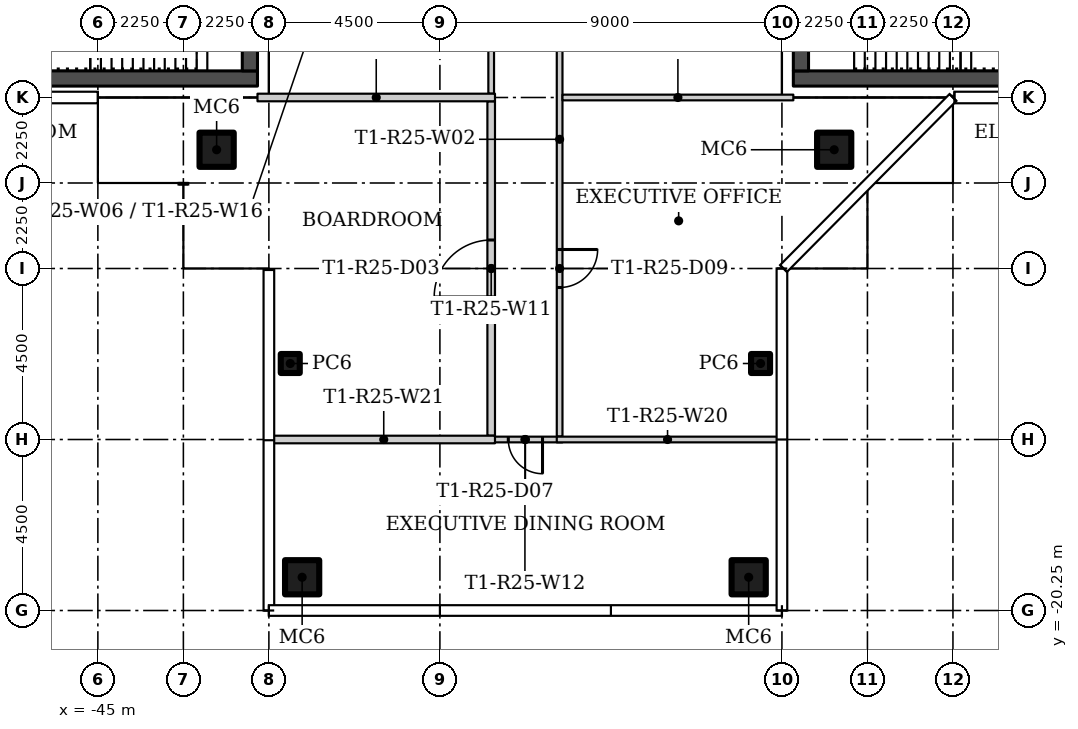
"""IFC4 building model, lengths in metres.
Left out: names, types, materials, properties, quantities, classifications, styles, units other than length and angle.
Written with IfcOpenShell. Run it as: python <this file> out.ifc"""

import sys

from ifc_helpers import new_model, si_unit, direction, frame, frame_2d, origin, origin_2d, place, context, subcontext, project, spatial, rectangle, hollow_rectangle, extrude, element, fill, save


model = new_model("IFC4")
c1 = context("Model", 3, precision=1e-05, world=origin(), true_north=direction((0.0, 1.0)))
c2 = subcontext(c1, "Body", "Model", "MODEL_VIEW")
j1 = project(units=[si_unit("LENGTHUNIT", "METRE"), si_unit("PLANEANGLEUNIT", "RADIAN")], contexts=[c1])
p1 = place(None, origin())
s1 = spatial("IfcSite", under=j1, at=p1, CompositionType="ELEMENT")
p2 = place(p1, origin())
s2 = spatial("IfcBuilding", under=s1, at=p2, CompositionType="ELEMENT")
p3 = place(p2, frame((0.0, 0.0, 230.4)))
s3 = spatial("IfcBuildingStorey", under=s2, at=p3, CompositionType="ELEMENT", Elevation=230.4)
for number, where in (
    (1, (-25.625, -8.125, 0.0)),
    (2, (-41.875, -8.125, 0.0)),
):
    element("IfcColumn", number, at=place(p3, frame(where)), inside=s3, PredefinedType="COLUMN", context=c2, shape_type="SweptSolid", body=[
        extrude(hollow_rectangle(XDim=0.9, YDim=0.9, WallThickness=0.036, at=origin_2d()), origin(), (0.0, 0.0, 1.0), 3.55),
    ])
p4 = place(p3, frame((-39.938, -13.75, 0.0)))
e3 = element("IfcColumn", 3, at=p4, inside=s3, PredefinedType="COLUMN", context=c2, shape_type="SweptSolid", body=[
    extrude(hollow_rectangle(XDim=0.5, YDim=0.5, WallThickness=0.016, at=origin_2d()), origin(), (0.0, 0.0, 1.0), 3.55),
])
p5 = place(p3, frame((-39.625, -19.375, 0.0)))
e4 = element("IfcColumn", 4, at=p5, inside=s3, PredefinedType="COLUMN", context=c2, shape_type="SweptSolid", body=[
    extrude(hollow_rectangle(XDim=0.9, YDim=0.9, WallThickness=0.036, at=origin_2d()), origin(), (0.0, 0.0, 1.0), 3.55),
])
p6 = place(p3, frame((-27.562, -13.75, 0.0)))
e5 = element("IfcColumn", 5, at=p6, inside=s3, PredefinedType="COLUMN", context=c2, shape_type="SweptSolid", body=[
    extrude(hollow_rectangle(XDim=0.5, YDim=0.5, WallThickness=0.016, at=origin_2d()), origin(), (0.0, 0.0, 1.0), 3.55),
])
p7 = place(p3, frame((-27.875, -19.375, 0.0)))
e6 = element("IfcColumn", 6, at=p7, inside=s3, PredefinedType="COLUMN", context=c2, shape_type="SweptSolid", body=[
    extrude(hollow_rectangle(XDim=0.9, YDim=0.9, WallThickness=0.036, at=origin_2d()), origin(), (0.0, 0.0, 1.0), 3.55),
])
p8 = place(p3, frame((-32.85, -0.025, 0.0), z_axis=(0.0, 0.0, 1.0), x_axis=(0.0, -1.0, 0.0)))
e7 = element("IfcWall", 7, at=p8, inside=s3, PredefinedType="PARTITIONING", context=c2, shape_type="SweptSolid", body=[
    extrude(rectangle(XDim=15.65, YDim=0.15, at=frame_2d((7.825, 0.0))), origin(), (0.0, 0.0, 1.0), 3.55),
])
p9 = place(p8, frame((2.875, 0.0, 0.0)))
e8 = element("IfcOpeningElement", 8, at=p9, cuts=e7, PredefinedType="OPENING", context=c2, shape_type="SweptSolid", body=[
    extrude(rectangle(XDim=0.9, YDim=2.1, at=frame_2d((0.45, 1.05))), frame((0.0, 0.085, 0.0), z_axis=(0.0, -1.0, 0.0), x_axis=(1.0, 0.0, 0.0)), (0.0, 0.0, 1.0), 0.17),
])
p10 = place(p8, frame((10.725, 0.0, 0.0)))
e9 = element("IfcOpeningElement", 9, at=p10, cuts=e7, PredefinedType="OPENING", context=c2, shape_type="SweptSolid", body=[
    extrude(rectangle(XDim=1.0, YDim=2.4, at=frame_2d((0.5, 1.2))), frame((0.0, 0.085, 0.0), z_axis=(0.0, -1.0, 0.0), x_axis=(1.0, 0.0, 0.0)), (0.0, 0.0, 1.0), 0.17),
])
p11 = place(p3, frame((-34.65, -6.65, 0.0), z_axis=(0.0, 0.0, 1.0), x_axis=(0.0, 1.0, 0.0)))
e10 = element("IfcWall", 10, at=p11, inside=s3, PredefinedType="PARTITIONING", context=c2, shape_type="SweptSolid", body=[
    extrude(rectangle(XDim=6.625, YDim=0.15, at=frame_2d((3.312, 0.0))), origin(), (0.0, 0.0, 1.0), 3.55),
])
p12 = place(p11, frame((2.8, 0.0, 0.0)))
e11 = element("IfcOpeningElement", 11, at=p12, cuts=e10, PredefinedType="OPENING", context=c2, shape_type="SweptSolid", body=[
    extrude(rectangle(XDim=1.0, YDim=2.4, at=frame_2d((0.5, 1.2))), frame((0.0, 0.085, 0.0), z_axis=(0.0, -1.0, 0.0), x_axis=(1.0, 0.0, 0.0)), (0.0, 0.0, 1.0), 0.17),
])
p13 = place(p3, frame((-34.65, -15.65, 0.0), z_axis=(0.0, 0.0, 1.0), x_axis=(0.0, 1.0, 0.0)))
e12 = element("IfcWall", 12, at=p13, inside=s3, PredefinedType="PARTITIONING", context=c2, shape_type="SweptSolid", body=[
    extrude(rectangle(XDim=8.8, YDim=0.2, at=frame_2d((4.4, 0.0))), origin(), (0.0, 0.0, 1.0), 3.55),
])
p14 = place(p13, frame((3.65, 0.0, 0.0)))
e13 = element("IfcOpeningElement", 13, at=p14, cuts=e12, PredefinedType="OPENING", context=c2, shape_type="SweptSolid", body=[
    extrude(rectangle(XDim=1.5, YDim=2.4, at=frame_2d((0.75, 1.2))), frame((0.0, 0.11, 0.0), z_axis=(0.0, -1.0, 0.0), x_axis=(1.0, 0.0, 0.0)), (0.0, 0.0, 1.0), 0.22),
])
p15 = place(p3, frame((-32.775, -15.75, 0.0), z_axis=(0.0, 0.0, 1.0), x_axis=(-1.0, 0.0, 0.0)))
e14 = element("IfcWall", 14, at=p15, inside=s3, PredefinedType="PARTITIONING", context=c2, shape_type="SweptSolid", body=[
    extrude(rectangle(XDim=1.976, YDim=0.15, at=frame_2d((0.988, 0.0))), origin(), (0.0, 0.0, 1.0), 3.55),
])
p16 = place(p15, frame((0.525, 0.0, 0.0)))
e15 = element("IfcOpeningElement", 15, at=p16, cuts=e14, PredefinedType="OPENING", context=c2, shape_type="SweptSolid", body=[
    extrude(rectangle(XDim=0.9, YDim=2.1, at=frame_2d((0.45, 1.05))), frame((0.0, 0.085, 0.0), z_axis=(0.0, -1.0, 0.0), x_axis=(1.0, 0.0, 0.0)), (0.0, 0.0, 1.0), 0.17),
])
p17 = place(p3, frame((-32.775, -6.75, 0.0)))
e16 = element("IfcWall", 16, at=p17, inside=s3, PredefinedType="PARTITIONING", context=c2, shape_type="SweptSolid", body=[
    extrude(rectangle(XDim=6.075, YDim=0.15, at=frame_2d((3.037, 0.0))), origin(), (0.0, 0.0, 1.0), 3.55),
])
p18 = place(p3, frame((-40.8, -6.75, 0.0)))
e17 = element("IfcWall", 17, at=p18, inside=s3, PredefinedType="PARTITIONING", context=c2, shape_type="SweptSolid", body=[
    extrude(rectangle(XDim=6.25, YDim=0.2, at=frame_2d((3.125, 0.0))), origin(), (0.0, 0.0, 1.0), 3.55),
])
p19 = place(p3, frame((-32.925, -15.75, 0.0)))
e18 = element("IfcWall", 18, at=p19, inside=s3, PredefinedType="PARTITIONING", context=c2, shape_type="SweptSolid", body=[
    extrude(rectangle(XDim=5.83, YDim=0.15, at=frame_2d((2.915, 0.0))), origin(), (0.0, 0.0, 1.0), 3.55),
])
p20 = place(p3, frame((-40.405, -15.75, 0.0)))
e19 = element("IfcWall", 19, at=p20, inside=s3, PredefinedType="PARTITIONING", context=c2, shape_type="SweptSolid", body=[
    extrude(rectangle(XDim=5.855, YDim=0.2, at=frame_2d((2.927, 0.0))), origin(), (0.0, 0.0, 1.0), 3.55),
])
p21 = place(p3, frame((-26.7, -6.25, 0.0)))
e20 = element("IfcWall", 20, at=p21, inside=s3, PredefinedType="SHEAR", context=c2, shape_type="SweptSolid", body=[
    extrude(rectangle(XDim=12.9, YDim=0.4, at=frame_2d((6.45, 0.0))), origin(), (0.0, 0.0, 1.0), 3.55),
])
p22 = place(p3, frame((-26.5, 6.05, 0.0), z_axis=(0.0, 0.0, 1.0), x_axis=(0.0, -1.0, 0.0)))
e21 = element("IfcWall", 21, at=p22, inside=s3, PredefinedType="SHEAR", context=c2, shape_type="SweptSolid", body=[
    extrude(rectangle(XDim=12.1, YDim=0.4, at=frame_2d((6.05, 0.0))), origin(), (0.0, 0.0, 1.0), 3.55),
])
p23 = place(p22, frame((3.9, 0.0, 0.0)))
e22 = element("IfcOpeningElement", 22, at=p23, cuts=e21, PredefinedType="OPENING", context=c2, shape_type="SweptSolid", body=[
    extrude(rectangle(XDim=1.8, YDim=2.4, at=frame_2d((0.9, 1.2))), frame((0.0, 0.21, 0.0), z_axis=(0.0, -1.0, 0.0), x_axis=(1.0, 0.0, 0.0)), (0.0, 0.0, 1.0), 0.42),
])
p24 = place(p3, frame((-40.8, -6.25, 0.0), z_axis=(0.0, 0.0, 1.0), x_axis=(-1.0, 0.0, 0.0)))
e23 = element("IfcWall", 23, at=p24, inside=s3, PredefinedType="SHEAR", context=c2, shape_type="SweptSolid", body=[
    extrude(rectangle(XDim=12.9, YDim=0.4, at=frame_2d((6.45, 0.0))), origin(), (0.0, 0.0, 1.0), 3.55),
])
p25 = place(p3, frame((-41.0, -6.05, 0.0), z_axis=(0.0, 0.0, 1.0), x_axis=(0.0, 1.0, 0.0)))
e24 = element("IfcWall", 24, at=p25, inside=s3, PredefinedType="SHEAR", context=c2, shape_type="SweptSolid", body=[
    extrude(rectangle(XDim=12.1, YDim=0.4, at=frame_2d((6.05, 0.0))), origin(), (0.0, 0.0, 1.0), 3.55),
])
p26 = place(p25, frame((6.4, 0.0, 0.0)))
e25 = element("IfcOpeningElement", 25, at=p26, cuts=e24, PredefinedType="OPENING", context=c2, shape_type="SweptSolid", body=[
    extrude(rectangle(XDim=1.8, YDim=2.4, at=frame_2d((0.9, 1.2))), frame((0.0, 0.21, 0.0), z_axis=(0.0, -1.0, 0.0), x_axis=(1.0, 0.0, 0.0)), (0.0, 0.0, 1.0), 0.42),
])
p27 = place(p14, origin())
e26 = element("IfcDoor", 26, at=p27, inside=s3, OperationType="DOUBLE_DOOR_SINGLE_SWING", PredefinedType="DOOR", context=c2, shape_type="SweptSolid", body=[
    extrude(rectangle(XDim=1.5, YDim=2.4, at=frame_2d((0.75, 1.2))), frame((0.0, 0.025, 0.0), z_axis=(0.0, -1.0, 0.0), x_axis=(1.0, 0.0, 0.0)), (0.0, 0.0, 1.0), 0.05),
])
fill(e13, e26)
p28 = place(p16, origin())
e27 = element("IfcDoor", 27, at=p28, inside=s3, OperationType="SINGLE_SWING_LEFT", PredefinedType="DOOR", context=c2, shape_type="SweptSolid", body=[
    extrude(rectangle(XDim=0.9, YDim=2.1, at=frame_2d((0.45, 1.05))), frame((0.0, 0.025, 0.0), z_axis=(0.0, -1.0, 0.0), x_axis=(1.0, 0.0, 0.0)), (0.0, 0.0, 1.0), 0.05),
])
fill(e15, e27)
p29 = place(p10, origin())
e28 = element("IfcDoor", 28, at=p29, inside=s3, OperationType="SINGLE_SWING_LEFT", PredefinedType="DOOR", context=c2, shape_type="SweptSolid", body=[
    extrude(rectangle(XDim=1.0, YDim=2.4, at=frame_2d((0.5, 1.2))), frame((0.0, 0.025, 0.0), z_axis=(0.0, -1.0, 0.0), x_axis=(1.0, 0.0, 0.0)), (0.0, 0.0, 1.0), 0.05),
])
fill(e9, e28)
save(model, sys.argv[1])
